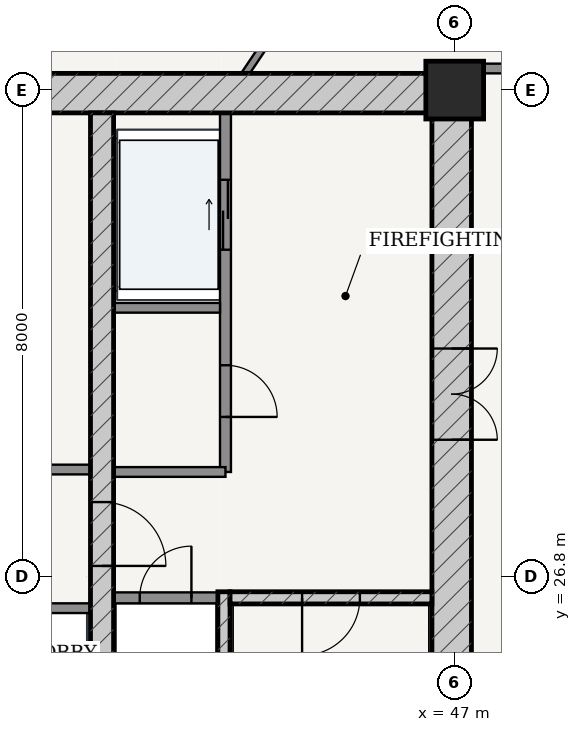
"""IFC4 building model, lengths in metres.
Left out: names, types, materials, properties, quantities, classifications, styles, units other than length and angle.
Written with IfcOpenShell. Run it as: python <this file> out.ifc"""

import sys

from ifc_helpers import new_model, si_unit, direction, frame, frame_2d, origin, origin_2d, place, context, subcontext, project, spatial, rectangle, extrude, source, transform, mapped, element, fill, save


model = new_model("IFC4")
c1 = context("Model", 3, precision=1e-05, world=origin(), true_north=direction((-0.2419218956, 0.970295726276)))
c2 = subcontext(c1, "Body", "Model", "MODEL_VIEW")
j1 = project(units=[si_unit("LENGTHUNIT", "METRE"), si_unit("PLANEANGLEUNIT", "RADIAN")], contexts=[c1])
p1 = place(None, origin())
s1 = spatial("IfcSite", under=j1, at=p1, CompositionType="ELEMENT")
p2 = place(p1, origin())
s2 = spatial("IfcBuilding", under=s1, at=p2, CompositionType="ELEMENT")
p3 = place(p2, frame((0.0, 0.0, 167.8)))
s3 = spatial("IfcBuildingStorey", under=s2, at=p3, CompositionType="ELEMENT", Elevation=167.8)
p4 = place(p3, frame((47.0, 34.8, 0.0), z_axis=(0.0, 0.0, 1.0), x_axis=(1.0, 0.0, 0.0)))
e1 = element("IfcColumn", 1, at=p4, inside=s3, PredefinedType="COLUMN", context=c2, shape_type="SweptSolid", body=[
    extrude(rectangle(XDim=0.95, YDim=0.95, at=origin_2d()), origin(), (0.0, 0.0, 1.0), 3.6),
])
p5 = place(p3, frame((28.725, 34.75, 0.0), z_axis=(0.0, 0.0, 1.0), x_axis=(1.0, 0.0, 0.0)))
e2 = element("IfcWall", 2, at=p5, inside=s3, PredefinedType="SHEAR", context=c2, shape_type="SweptSolid", body=[
    extrude(rectangle(XDim=18.55, YDim=0.65, at=frame_2d((9.275, 0.0))), origin(), (0.0, 0.0, 1.0), 3.33),
])
p6 = place(p3, frame((46.95, 19.175, 0.0), z_axis=(0.0, 0.0, 1.0), x_axis=(0.0, 1.0, 0.0)))
e3 = element("IfcWall", 3, at=p6, inside=s3, PredefinedType="SHEAR", context=c2, shape_type="SweptSolid", body=[
    extrude(rectangle(XDim=15.25, YDim=0.65, at=frame_2d((7.625, 0.0))), origin(), (0.0, 0.0, 1.0), 3.33),
])
p7 = place(p6, frame((9.875, 0.0, 0.0)))
e4 = element("IfcOpeningElement", 4, at=p7, cuts=e3, PredefinedType="OPENING", context=c2, shape_type="SweptSolid", body=[
    extrude(rectangle(XDim=1.5, YDim=2.2, at=frame_2d((0.75, 1.1))), frame((0.0, 0.335, 0.0), z_axis=(0.0, -1.0, 0.0), x_axis=(1.0, 0.0, 0.0)), (0.0, 0.0, 1.0), 0.67),
])
p8 = place(p3, frame((43.205, 19.175, 0.0), z_axis=(0.0, 0.0, 1.0), x_axis=(0.0, 1.0, 0.0)))
e5 = element("IfcWall", 5, at=p8, inside=s3, PredefinedType="SOLIDWALL", context=c2, shape_type="SweptSolid", body=[
    extrude(rectangle(XDim=7.375, YDim=0.2, at=frame_2d((3.688, 0.0))), origin(), (0.0, 0.0, 1.0), 3.33),
])
p9 = place(p3, frame((43.305, 26.45, 0.0), z_axis=(0.0, 0.0, 1.0), x_axis=(1.0, 0.0, 0.0)))
e6 = element("IfcWall", 6, at=p9, inside=s3, PredefinedType="SOLIDWALL", context=c2, shape_type="SweptSolid", body=[
    extrude(rectangle(XDim=3.32, YDim=0.2, at=frame_2d((1.66, 0.0))), origin(), (0.0, 0.0, 1.0), 3.33),
])
p10 = place(p9, frame((1.185, 0.0, 0.0)))
e7 = element("IfcOpeningElement", 7, at=p10, cuts=e6, PredefinedType="OPENING", context=c2, shape_type="SweptSolid", body=[
    extrude(rectangle(XDim=0.95, YDim=2.15, at=frame_2d((0.475, 1.075))), frame((0.0, 0.11, 0.0), z_axis=(0.0, -1.0, 0.0), x_axis=(1.0, 0.0, 0.0)), (0.0, 0.0, 1.0), 0.22),
])
p11 = place(p3, frame((41.2, 19.175, 0.0), z_axis=(0.0, 0.0, 1.0), x_axis=(0.0, 1.0, 0.0)))
e8 = element("IfcWall", 8, at=p11, inside=s3, PredefinedType="SHEAR", context=c2, shape_type="SweptSolid", body=[
    extrude(rectangle(XDim=15.25, YDim=0.38, at=frame_2d((7.625, 0.0))), origin(), (0.0, 0.0, 1.0), 3.33),
])
p12 = place(p11, frame((7.8, 0.0, 0.0)))
e9 = element("IfcOpeningElement", 9, at=p12, cuts=e8, PredefinedType="OPENING", context=c2, shape_type="SweptSolid", body=[
    extrude(rectangle(XDim=1.05, YDim=2.15, at=frame_2d((0.525, 1.075))), frame((0.0, 0.2, 0.0), z_axis=(0.0, -1.0, 0.0), x_axis=(1.0, 0.0, 0.0)), (0.0, 0.0, 1.0), 0.4),
])
p13 = place(p3, frame((41.39, 26.45, 0.0), z_axis=(0.0, 0.0, 1.0), x_axis=(1.0, 0.0, 0.0)))
e10 = element("IfcWall", 10, at=p13, inside=s3, PredefinedType="PARTITIONING", context=c2, shape_type="SweptSolid", body=[
    extrude(rectangle(XDim=1.71, YDim=0.18, at=frame_2d((0.855, 0.0))), origin(), (0.0, 0.0, 1.0), 3.33),
])
p14 = place(p13, frame((0.43, 0.0, 0.0)))
e11 = element("IfcOpeningElement", 11, at=p14, cuts=e10, PredefinedType="OPENING", context=c2, shape_type="SweptSolid", body=[
    extrude(rectangle(XDim=0.85, YDim=2.1, at=frame_2d((0.425, 1.05))), frame((0.0, 0.1, 0.0), z_axis=(0.0, -1.0, 0.0), x_axis=(1.0, 0.0, 0.0)), (0.0, 0.0, 1.0), 0.2),
])
p15 = place(p3, frame((43.23, 28.52, 0.0), z_axis=(0.0, 0.0, 1.0), x_axis=(0.0, 1.0, 0.0)))
e12 = element("IfcWall", 12, at=p15, inside=s3, PredefinedType="PARTITIONING", context=c2, shape_type="SweptSolid", body=[
    extrude(rectangle(XDim=5.905, YDim=0.18, at=frame_2d((2.953, 0.0))), origin(), (0.0, 0.0, 1.0), 3.33),
])
p16 = place(p15, frame((0.905, 0.0, 0.0)))
e13 = element("IfcOpeningElement", 13, at=p16, cuts=e12, PredefinedType="OPENING", context=c2, shape_type="SweptSolid", body=[
    extrude(rectangle(XDim=0.85, YDim=2.1, at=frame_2d((0.425, 1.05))), frame((0.0, 0.1, 0.0), z_axis=(0.0, -1.0, 0.0), x_axis=(1.0, 0.0, 0.0)), (0.0, 0.0, 1.0), 0.2),
])
p17 = place(p15, frame((3.655, 0.0, 0.0)))
e14 = element("IfcOpeningElement", 14, at=p17, cuts=e12, PredefinedType="OPENING", context=c2, shape_type="SweptSolid", body=[
    extrude(rectangle(XDim=1.15, YDim=2.2, at=frame_2d((0.575, 1.1))), frame((0.0, 0.1, 0.0), z_axis=(0.0, -1.0, 0.0), x_axis=(1.0, 0.0, 0.0)), (0.0, 0.0, 1.0), 0.2),
])
p18 = place(p3, frame((41.39, 31.22, 0.0), z_axis=(0.0, 0.0, 1.0), x_axis=(1.0, 0.0, 0.0)))
e15 = element("IfcWall", 15, at=p18, inside=s3, PredefinedType="PARTITIONING", context=c2, shape_type="SweptSolid", body=[
    extrude(rectangle(XDim=1.75, YDim=0.16, at=frame_2d((0.875, 0.0))), origin(), (0.0, 0.0, 1.0), 3.33),
])
p19 = place(p3, frame((41.39, 28.52, 0.0), z_axis=(0.0, 0.0, 1.0), x_axis=(1.0, 0.0, 0.0)))
e16 = element("IfcWall", 16, at=p19, inside=s3, PredefinedType="PARTITIONING", context=c2, shape_type="SweptSolid", body=[
    extrude(rectangle(XDim=1.84, YDim=0.16, at=frame_2d((0.92, 0.0))), origin(), (0.0, 0.0, 1.0), 3.33),
])
p20 = place(p3, frame((34.99, 28.56, 0.0), z_axis=(0.0, 0.0, 1.0), x_axis=(1.0, 0.0, 0.0)))
e17 = element("IfcWall", 17, at=p20, inside=s3, PredefinedType="PARTITIONING", context=c2, shape_type="SweptSolid", body=[
    extrude(rectangle(XDim=6.02, YDim=0.16, at=frame_2d((3.01, 0.0))), origin(), (0.0, 0.0, 1.0), 3.33),
])
p21 = place(p20, frame((1.025, 0.0, 0.0)))
e18 = element("IfcOpeningElement", 18, at=p21, cuts=e17, PredefinedType="OPENING", context=c2, shape_type="SweptSolid", body=[
    extrude(rectangle(XDim=0.86, YDim=2.1, at=frame_2d((0.43, 1.05))), frame((0.0, 0.09, 0.0), z_axis=(0.0, -1.0, 0.0), x_axis=(1.0, 0.0, 0.0)), (0.0, 0.0, 1.0), 0.18),
])
p22 = place(p20, frame((4.14, 0.0, 0.0)))
e19 = element("IfcOpeningElement", 19, at=p22, cuts=e17, PredefinedType="OPENING", context=c2, shape_type="SweptSolid", body=[
    extrude(rectangle(XDim=0.85, YDim=2.1, at=frame_2d((0.425, 1.05))), frame((0.0, 0.09, 0.0), z_axis=(0.0, -1.0, 0.0), x_axis=(1.0, 0.0, 0.0)), (0.0, 0.0, 1.0), 0.18),
])
p23 = place(p3, frame((34.99, 26.28, 0.0), z_axis=(0.0, 0.0, 1.0), x_axis=(1.0, 0.0, 0.0)))
e20 = element("IfcWall", 20, at=p23, inside=s3, PredefinedType="PARTITIONING", context=c2, shape_type="SweptSolid", body=[
    extrude(rectangle(XDim=6.02, YDim=0.16, at=frame_2d((3.01, 0.0))), origin(), (0.0, 0.0, 1.0), 3.33),
])
p24 = place(p23, frame((0.225, 0.0, 0.0)))
e21 = element("IfcOpeningElement", 21, at=p24, cuts=e20, PredefinedType="OPENING", context=c2, shape_type="SweptSolid", body=[
    extrude(rectangle(XDim=1.1, YDim=2.2, at=frame_2d((0.55, 1.1))), frame((0.0, 0.09, 0.0), z_axis=(0.0, -1.0, 0.0), x_axis=(1.0, 0.0, 0.0)), (0.0, 0.0, 1.0), 0.18),
])
p25 = place(p23, frame((1.705, 0.0, 0.0)))
e22 = element("IfcOpeningElement", 22, at=p25, cuts=e20, PredefinedType="OPENING", context=c2, shape_type="SweptSolid", body=[
    extrude(rectangle(XDim=1.1, YDim=2.2, at=frame_2d((0.55, 1.1))), frame((0.0, 0.09, 0.0), z_axis=(0.0, -1.0, 0.0), x_axis=(1.0, 0.0, 0.0)), (0.0, 0.0, 1.0), 0.18),
])
p26 = place(p3, frame((47.275, 35.155, 0.0), z_axis=(0.0, 0.0, 1.0), x_axis=(1.0, 0.0, 0.0)))
e23 = element("IfcWall", 23, at=p26, inside=s3, PredefinedType="PARTITIONING", context=c2, shape_type="SweptSolid", body=[
    extrude(rectangle(XDim=1.93, YDim=0.16, at=frame_2d((0.965, 0.0))), origin(), (0.0, 0.0, 1.0), 2.776),
])
p27 = place(p3, frame((43.559, 35.075, 0.0), z_axis=(0.0, 0.0, 1.0), x_axis=(0.557612855606, 0.830101140381, 0.0)))
e24 = element("IfcWall", 24, at=p27, inside=s3, PredefinedType="PARTITIONING", context=c2, shape_type="SweptSolid", body=[
    extrude(rectangle(XDim=3.323, YDim=0.12, at=frame_2d((1.662, 0.0))), origin(), (0.0, 0.0, 1.0), 3.33),
])
p28 = place(p27, frame((1.232, 0.0, 0.0)))
e25 = element("IfcOpeningElement", 25, at=p28, cuts=e24, PredefinedType="OPENING", context=c2, shape_type="SweptSolid", body=[
    extrude(rectangle(XDim=0.86, YDim=2.15, at=frame_2d((0.43, 1.075))), frame((0.0, 0.07, 0.0), z_axis=(0.0, -1.0, 0.0), x_axis=(1.0, 0.0, 0.0)), (0.0, 0.0, 1.0), 0.14),
])
m1 = source(origin(), c2, "Body", "SweptSolid", [
    extrude(rectangle(XDim=1.5, YDim=2.2, at=frame_2d((0.75, 1.1))), frame((0.0, 0.025, 0.0), z_axis=(0.0, -1.0, 0.0), x_axis=(1.0, 0.0, 0.0)), (0.0, 0.0, 1.0), 0.05),
])
p29 = place(p7, frame((1.5, 0.0, 0.0), z_axis=(0.0, 0.0, 1.0), x_axis=(-1.0, 0.0, 0.0)))
e26 = element("IfcDoor", 26, at=p29, inside=s3, OperationType="DOUBLE_DOOR_SINGLE_SWING", PredefinedType="DOOR", context=c2, shape_type="MappedRepresentation", body=[
    mapped(m1, transform((0.0, 0.0, 0.0), scale=1.0)),
])
fill(e4, e26)
m2 = source(origin(), c2, "Body", "SweptSolid", [
    extrude(rectangle(XDim=1.05, YDim=2.15, at=frame_2d((0.525, 1.075))), frame((0.0, 0.025, 0.0), z_axis=(0.0, -1.0, 0.0), x_axis=(1.0, 0.0, 0.0)), (0.0, 0.0, 1.0), 0.05),
])
p30 = place(p12, frame((1.05, 0.0, 0.0), z_axis=(0.0, 0.0, 1.0), x_axis=(-1.0, 0.0, 0.0)))
e27 = element("IfcDoor", 27, at=p30, inside=s3, OperationType="SINGLE_SWING_RIGHT", PredefinedType="DOOR", context=c2, shape_type="MappedRepresentation", body=[
    mapped(m2, transform((0.0, 0.0, 0.0), scale=1.0)),
])
fill(e9, e27)
m3 = source(origin(), c2, "Body", "SweptSolid", [
    extrude(rectangle(XDim=0.95, YDim=2.15, at=frame_2d((0.475, 1.075))), frame((0.0, 0.025, 0.0), z_axis=(0.0, -1.0, 0.0), x_axis=(1.0, 0.0, 0.0)), (0.0, 0.0, 1.0), 0.05),
])
p31 = place(p10, frame((0.95, 0.0, 0.0), z_axis=(0.0, 0.0, 1.0), x_axis=(-1.0, 0.0, 0.0)))
e28 = element("IfcDoor", 28, at=p31, inside=s3, OperationType="SINGLE_SWING_RIGHT", PredefinedType="DOOR", context=c2, shape_type="MappedRepresentation", body=[
    mapped(m3, transform((0.0, 0.0, 0.0), scale=1.0)),
])
fill(e7, e28)
m4 = source(origin(), c2, "Body", "SweptSolid", [
    extrude(rectangle(XDim=0.85, YDim=2.1, at=frame_2d((0.425, 1.05))), frame((0.0, 0.025, 0.0), z_axis=(0.0, -1.0, 0.0), x_axis=(1.0, 0.0, 0.0)), (0.0, 0.0, 1.0), 0.05),
])
p32 = place(p14, origin())
e29 = element("IfcDoor", 29, at=p32, inside=s3, OperationType="SINGLE_SWING_RIGHT", PredefinedType="DOOR", context=c2, shape_type="MappedRepresentation", body=[
    mapped(m4, transform((0.0, 0.0, 0.0), scale=1.0)),
])
fill(e11, e29)
p33 = place(p16, frame((0.85, 0.0, 0.0), z_axis=(0.0, 0.0, 1.0), x_axis=(-1.0, 0.0, 0.0)))
e30 = element("IfcDoor", 30, at=p33, inside=s3, OperationType="SINGLE_SWING_RIGHT", PredefinedType="DOOR", context=c2, shape_type="MappedRepresentation", body=[
    mapped(m4, transform((0.0, 0.0, 0.0), scale=1.0)),
])
fill(e13, e30)
m5 = source(origin(), c2, "Body", "SweptSolid", [
    extrude(rectangle(XDim=1.15, YDim=2.2, at=frame_2d((0.575, 1.1))), frame((0.0, 0.025, 0.0), z_axis=(0.0, -1.0, 0.0), x_axis=(1.0, 0.0, 0.0)), (0.0, 0.0, 1.0), 0.05),
])
p34 = place(p17, origin())
e31 = element("IfcDoor", 31, at=p34, inside=s3, OperationType="DOUBLE_DOOR_SLIDING", PredefinedType="DOOR", context=c2, shape_type="MappedRepresentation", body=[
    mapped(m5, transform((0.0, 0.0, 0.0), scale=1.0)),
])
fill(e14, e31)
save(model, sys.argv[1])
